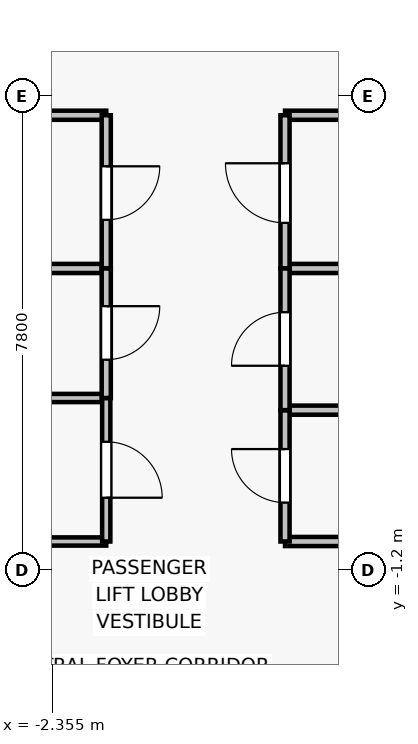
"""IFC4 building model, lengths in metres.
Left out: names, types, materials, properties, quantities, classifications, styles, units other than length and angle.
Written with IfcOpenShell. Run it as: python <this file> out.ifc"""

import sys

from ifc_helpers import new_model, si_unit, direction, frame, frame_2d, origin, place, context, subcontext, project, spatial, rectangle, extrude, source, transform, mapped, element, fill, save


model = new_model("IFC4")
c1 = context("Model", 3, precision=1e-05, world=origin(), true_north=direction((0.0, 1.0)))
c2 = subcontext(c1, "Body", "Model", "MODEL_VIEW")
j1 = project(units=[si_unit("LENGTHUNIT", "METRE"), si_unit("PLANEANGLEUNIT", "RADIAN")], contexts=[c1])
p1 = place(None, origin())
s1 = spatial("IfcSite", under=j1, at=p1, CompositionType="ELEMENT")
p2 = place(p1, origin())
s2 = spatial("IfcBuilding", under=s1, at=p2, CompositionType="ELEMENT")
p3 = place(p2, frame((0.0, 0.0, 245.2)))
s3 = spatial("IfcBuildingStorey", under=s2, at=p3, CompositionType="ELEMENT", Elevation=245.2)
for number, where, z_axis, x_axis in (
    (1, (-1.47, 3.76, 0.0), (0.0, 0.0, 1.0), (-1.0, 0.0, 0.0)),
    (2, (-3.87, 6.28, 0.0), (0.0, 0.0, 1.0), (1.0, 0.0, 0.0)),
):
    element("IfcWall", number, at=place(p3, frame(where, z_axis=z_axis, x_axis=x_axis)), inside=s3, PredefinedType="PARTITIONING", context=c2, shape_type="SweptSolid", body=[
        extrude(rectangle(XDim=2.4, YDim=0.15, at=frame_2d((1.2, 0.0))), origin(), (0.0, 0.0, 1.0), 3.075),
    ])
p4 = place(p3, frame((-1.47, 6.28, 0.0), z_axis=(0.0, 0.0, 1.0), x_axis=(0.0, -1.0, 0.0)))
e3 = element("IfcWall", 3, at=p4, inside=s3, PredefinedType="PARTITIONING", context=c2, shape_type="SweptSolid", body=[
    extrude(rectangle(XDim=2.52, YDim=0.15, at=frame_2d((1.26, 0.0))), origin(), (0.0, 0.0, 1.0), 3.075),
])
p5 = place(p4, frame((0.84, 0.0, 0.0)))
e4 = element("IfcOpeningElement", 4, at=p5, cuts=e3, PredefinedType="OPENING", context=c2, shape_type="SweptSolid", body=[
    extrude(rectangle(XDim=0.88, YDim=2.1, at=frame_2d((0.44, 1.05))), frame((0.0, 0.085, 0.0), z_axis=(0.0, -1.0, 0.0), x_axis=(1.0, 0.0, 0.0)), (0.0, 0.0, 1.0), 0.17),
])
for number, where, z_axis, x_axis in (
    (5, (6.38, 3.76, 0.0), (0.0, 0.0, 1.0), (-1.0, 0.0, 0.0)),
    (6, (1.47, 6.28, 0.0), (0.0, 0.0, 1.0), (1.0, 0.0, 0.0)),
):
    element("IfcWall", number, at=place(p3, frame(where, z_axis=z_axis, x_axis=x_axis)), inside=s3, PredefinedType="PARTITIONING", context=c2, shape_type="SweptSolid", body=[
        extrude(rectangle(XDim=4.91, YDim=0.15, at=frame_2d((2.455, 0.0))), origin(), (0.0, 0.0, 1.0), 3.075),
    ])
p6 = place(p3, frame((1.47, 3.76, 0.0), z_axis=(0.0, 0.0, 1.0), x_axis=(0.0, 1.0, 0.0)))
e7 = element("IfcWall", 7, at=p6, inside=s3, PredefinedType="PARTITIONING", context=c2, shape_type="SweptSolid", body=[
    extrude(rectangle(XDim=2.52, YDim=0.15, at=frame_2d((1.26, 0.0))), origin(), (0.0, 0.0, 1.0), 3.075),
])
p7 = place(p6, frame((0.75, 0.0, 0.0)))
e8 = element("IfcOpeningElement", 8, at=p7, cuts=e7, PredefinedType="OPENING", context=c2, shape_type="SweptSolid", body=[
    extrude(rectangle(XDim=0.98, YDim=2.15, at=frame_2d((0.49, 1.075))), frame((0.0, 0.085, 0.0), z_axis=(0.0, -1.0, 0.0), x_axis=(1.0, 0.0, 0.0)), (0.0, 0.0, 1.0), 0.17),
])
for number, where, z_axis, x_axis in (
    (9, (-1.47, -0.73, 0.0), (0.0, 0.0, 1.0), (-1.0, 0.0, 0.0)),
    (10, (-3.47, 1.63, 0.0), (0.0, 0.0, 1.0), (1.0, 0.0, 0.0)),
):
    element("IfcWall", number, at=place(p3, frame(where, z_axis=z_axis, x_axis=x_axis)), inside=s3, PredefinedType="PARTITIONING", context=c2, shape_type="SweptSolid", body=[
        extrude(rectangle(XDim=2.0, YDim=0.135, at=frame_2d((1.0, 0.0))), origin(), (0.0, 0.0, 1.0), 3.075),
    ])
p8 = place(p3, frame((-1.47, 1.63, 0.0), z_axis=(0.0, 0.0, 1.0), x_axis=(0.0, -1.0, 0.0)))
e11 = element("IfcWall", 11, at=p8, inside=s3, PredefinedType="PARTITIONING", context=c2, shape_type="SweptSolid", body=[
    extrude(rectangle(XDim=2.36, YDim=0.135, at=frame_2d((1.18, 0.0))), origin(), (0.0, 0.0, 1.0), 3.075),
])
p9 = place(p8, frame((0.72, 0.0, 0.0)))
e12 = element("IfcOpeningElement", 12, at=p9, cuts=e11, PredefinedType="OPENING", context=c2, shape_type="SweptSolid", body=[
    extrude(rectangle(XDim=0.92, YDim=2.1, at=frame_2d((0.46, 1.05))), frame((0.0, 0.077, 0.0), z_axis=(0.0, -1.0, 0.0), x_axis=(1.0, 0.0, 0.0)), (0.0, 0.0, 1.0), 0.155),
])
p10 = place(p3, frame((-1.47, 3.76, 0.0), z_axis=(0.0, 0.0, 1.0), x_axis=(0.0, -1.0, 0.0)))
e13 = element("IfcWall", 13, at=p10, inside=s3, PredefinedType="PARTITIONING", context=c2, shape_type="SweptSolid", body=[
    extrude(rectangle(XDim=2.13, YDim=0.15, at=frame_2d((1.065, 0.0))), origin(), (0.0, 0.0, 1.0), 3.075),
])
p11 = place(p10, frame((0.62, 0.0, 0.0)))
e14 = element("IfcOpeningElement", 14, at=p11, cuts=e13, PredefinedType="OPENING", context=c2, shape_type="SweptSolid", body=[
    extrude(rectangle(XDim=0.88, YDim=2.1, at=frame_2d((0.44, 1.05))), frame((0.0, 0.085, 0.0), z_axis=(0.0, -1.0, 0.0), x_axis=(1.0, 0.0, 0.0)), (0.0, 0.0, 1.0), 0.17),
])
for number, where, z_axis, x_axis in (
    (15, (3.68, -0.73, 0.0), (0.0, 0.0, 1.0), (-1.0, 0.0, 0.0)),
    (16, (1.47, 1.43, 0.0), (0.0, 0.0, 1.0), (1.0, 0.0, 0.0)),
):
    element("IfcWall", number, at=place(p3, frame(where, z_axis=z_axis, x_axis=x_axis)), inside=s3, PredefinedType="PARTITIONING", context=c2, shape_type="SweptSolid", body=[
        extrude(rectangle(XDim=2.21, YDim=0.15, at=frame_2d((1.105, 0.0))), origin(), (0.0, 0.0, 1.0), 3.075),
    ])
p12 = place(p3, frame((1.47, -0.73, 0.0), z_axis=(0.0, 0.0, 1.0), x_axis=(0.0, 1.0, 0.0)))
e17 = element("IfcWall", 17, at=p12, inside=s3, PredefinedType="PARTITIONING", context=c2, shape_type="SweptSolid", body=[
    extrude(rectangle(XDim=2.16, YDim=0.15, at=frame_2d((1.08, 0.0))), origin(), (0.0, 0.0, 1.0), 3.075),
])
p13 = place(p12, frame((0.64, 0.0, 0.0)))
e18 = element("IfcOpeningElement", 18, at=p13, cuts=e17, PredefinedType="OPENING", context=c2, shape_type="SweptSolid", body=[
    extrude(rectangle(XDim=0.88, YDim=2.1, at=frame_2d((0.44, 1.05))), frame((0.0, 0.085, 0.0), z_axis=(0.0, -1.0, 0.0), x_axis=(1.0, 0.0, 0.0)), (0.0, 0.0, 1.0), 0.17),
])
p14 = place(p3, frame((1.47, 1.43, 0.0), z_axis=(0.0, 0.0, 1.0), x_axis=(0.0, 1.0, 0.0)))
e19 = element("IfcWall", 19, at=p14, inside=s3, PredefinedType="PARTITIONING", context=c2, shape_type="SweptSolid", body=[
    extrude(rectangle(XDim=2.33, YDim=0.15, at=frame_2d((1.165, 0.0))), origin(), (0.0, 0.0, 1.0), 3.075),
])
p15 = place(p14, frame((0.73, 0.0, 0.0)))
e20 = element("IfcOpeningElement", 20, at=p15, cuts=e19, PredefinedType="OPENING", context=c2, shape_type="SweptSolid", body=[
    extrude(rectangle(XDim=0.88, YDim=2.15, at=frame_2d((0.44, 1.075))), frame((0.0, 0.085, 0.0), z_axis=(0.0, -1.0, 0.0), x_axis=(1.0, 0.0, 0.0)), (0.0, 0.0, 1.0), 0.17),
])
m1 = source(origin(), c2, "Body", "SweptSolid", [
    extrude(rectangle(XDim=0.88, YDim=2.1, at=frame_2d((0.44, 1.05))), frame((0.0, 0.025, 0.0), z_axis=(0.0, -1.0, 0.0), x_axis=(1.0, 0.0, 0.0)), (0.0, 0.0, 1.0), 0.05),
])
p16 = place(p5, origin())
e21 = element("IfcDoor", 21, at=p16, inside=s3, OperationType="SINGLE_SWING_LEFT", PredefinedType="DOOR", context=c2, shape_type="MappedRepresentation", body=[
    mapped(m1, transform((0.0, 0.0, 0.0), x_axis=(1.0, 0.0, 0.0), y_axis=(0.0, 1.0, 0.0), z_axis=(0.0, 0.0, 1.0), scale=1.0)),
])
fill(e4, e21)
m2 = source(origin(), c2, "Body", "SweptSolid", [
    extrude(rectangle(XDim=0.98, YDim=2.15, at=frame_2d((0.49, 1.075))), frame((0.0, 0.025, 0.0), z_axis=(0.0, -1.0, 0.0), x_axis=(1.0, 0.0, 0.0)), (0.0, 0.0, 1.0), 0.05),
])
p17 = place(p7, origin())
e22 = element("IfcDoor", 22, at=p17, inside=s3, OperationType="SINGLE_SWING_RIGHT", PredefinedType="DOOR", context=c2, shape_type="MappedRepresentation", body=[
    mapped(m2, transform((0.0, 0.0, 0.0), x_axis=(1.0, 0.0, 0.0), y_axis=(0.0, 1.0, 0.0), z_axis=(0.0, 0.0, 1.0), scale=1.0)),
])
fill(e8, e22)
m3 = source(origin(), c2, "Body", "SweptSolid", [
    extrude(rectangle(XDim=0.92, YDim=2.1, at=frame_2d((0.46, 1.05))), frame((0.0, 0.025, 0.0), z_axis=(0.0, -1.0, 0.0), x_axis=(1.0, 0.0, 0.0)), (0.0, 0.0, 1.0), 0.05),
])
p18 = place(p9, origin())
e23 = element("IfcDoor", 23, at=p18, inside=s3, OperationType="SINGLE_SWING_RIGHT", PredefinedType="DOOR", context=c2, shape_type="MappedRepresentation", body=[
    mapped(m3, transform((0.0, 0.0, 0.0), x_axis=(1.0, 0.0, 0.0), y_axis=(0.0, 1.0, 0.0), z_axis=(0.0, 0.0, 1.0), scale=1.0)),
])
fill(e12, e23)
p19 = place(p11, origin())
e24 = element("IfcDoor", 24, at=p19, inside=s3, OperationType="SINGLE_SWING_LEFT", PredefinedType="DOOR", context=c2, shape_type="MappedRepresentation", body=[
    mapped(m1, transform((0.0, 0.0, 0.0), x_axis=(1.0, 0.0, 0.0), y_axis=(0.0, 1.0, 0.0), z_axis=(0.0, 0.0, 1.0), scale=1.0)),
])
fill(e14, e24)
p20 = place(p13, origin())
e25 = element("IfcDoor", 25, at=p20, inside=s3, OperationType="SINGLE_SWING_RIGHT", PredefinedType="DOOR", context=c2, shape_type="MappedRepresentation", body=[
    mapped(m1, transform((0.0, 0.0, 0.0), x_axis=(1.0, 0.0, 0.0), y_axis=(0.0, 1.0, 0.0), z_axis=(0.0, 0.0, 1.0), scale=1.0)),
])
fill(e18, e25)
m4 = source(origin(), c2, "Body", "SweptSolid", [
    extrude(rectangle(XDim=0.88, YDim=2.15, at=frame_2d((0.44, 1.075))), frame((0.0, 0.025, 0.0), z_axis=(0.0, -1.0, 0.0), x_axis=(1.0, 0.0, 0.0)), (0.0, 0.0, 1.0), 0.05),
])
p21 = place(p15, origin())
e26 = element("IfcDoor", 26, at=p21, inside=s3, OperationType="SINGLE_SWING_LEFT", PredefinedType="DOOR", context=c2, shape_type="MappedRepresentation", body=[
    mapped(m4, transform((0.0, 0.0, 0.0), x_axis=(1.0, 0.0, 0.0), y_axis=(0.0, 1.0, 0.0), z_axis=(0.0, 0.0, 1.0), scale=1.0)),
])
fill(e20, e26)
save(model, sys.argv[1])
